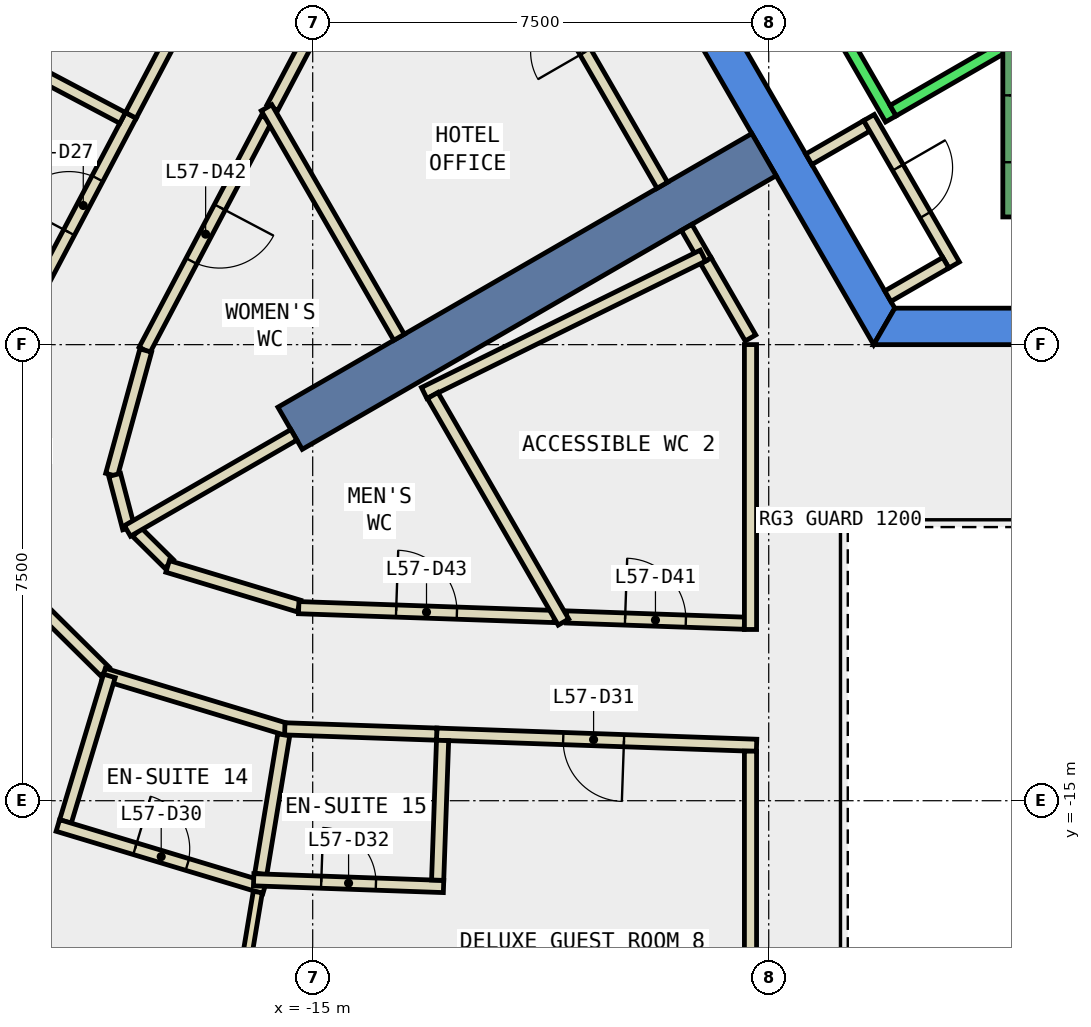
"""IFC4 building model, lengths in metres.
Left out: names, types, materials, properties, quantities, classifications, styles, units other than length and angle.
Written with IfcOpenShell. Run it as: python <this file> out.ifc"""

import sys

from ifc_helpers import new_model, si_unit, direction, frame, frame_2d, origin, place, context, subcontext, project, spatial, polyline, rectangle, outline, extrude, element, fill, save


model = new_model("IFC4")
c1 = context("Model", 3, precision=1e-05, world=origin(), true_north=direction((0.0, 1.0)))
c2 = subcontext(c1, "Body", "Model", "MODEL_VIEW")
j1 = project(units=[si_unit("LENGTHUNIT", "METRE"), si_unit("PLANEANGLEUNIT", "RADIAN")], contexts=[c1])
p1 = place(None, origin())
s1 = spatial("IfcSite", under=j1, at=p1, CompositionType="ELEMENT")
p2 = place(p1, origin())
s2 = spatial("IfcBuilding", under=s1, at=p2, CompositionType="ELEMENT")
p3 = place(p2, frame((0.0, 0.0, 252.2)))
s3 = spatial("IfcBuildingStorey", under=s2, at=p3, CompositionType="ELEMENT", Elevation=252.2)
p4 = place(p3, frame((0.0, 0.0, -0.34)))
e1 = element("IfcWall", 1, at=p4, inside=s3, PredefinedType="SHEAR", context=c2, shape_type="SweptSolid", body=[
    extrude(outline(polyline([(-11.547, 2.5), (-5.774, -7.5), (-5.427, -6.9), (-10.854, 2.5), (-11.547, 2.5)])), origin(), (0.0, 0.0, 1.0), 3.6),
])
p5 = place(p3, frame((0.0, 0.0, -0.34)))
e2 = element("IfcWall", 2, at=p5, inside=s3, PredefinedType="SHEAR", context=c2, shape_type="SweptSolid", body=[
    extrude(outline(polyline([(3.75, -7.5), (3.75, -6.9), (-5.427, -6.9), (-5.774, -7.5), (3.75, -7.5)])), origin(), (0.0, 0.0, 1.0), 3.6),
])
p6 = place(p3, frame((-7.578, -4.375, -0.34), z_axis=(0.0, 0.0, 1.0), x_axis=(-0.866024315419, -0.5000018851, 0.0)))
e3 = element("IfcWall", 3, at=p6, inside=s3, PredefinedType="SHEAR", context=c2, shape_type="SweptSolid", body=[
    extrude(rectangle(XDim=9.0, YDim=0.8, at=frame_2d((4.5, 0.0))), origin(), (0.0, 0.0, 1.0), 3.6),
])
p7 = place(p3, frame((-8.532, -6.123, 0.0), z_axis=(0.0, 0.0, 1.0), x_axis=(-0.499977104415, 0.866038622153, 0.0)))
e4 = element("IfcWall", 4, at=p7, inside=s3, PredefinedType="PARTITIONING", context=c2, shape_type="SweptSolid", body=[
    extrude(rectangle(XDim=0.636, YDim=0.2, at=frame_2d((0.318, 0.0))), origin(), (0.0, 0.0, 1.0), 3.26),
])
p8 = place(p3, frame((-15.064, -2.468, 0.0), z_axis=(0.0, 0.0, 1.0), x_axis=(-0.467126648849, -0.884190417238, 0.0)))
e5 = element("IfcWall", 5, at=p8, inside=s3, PredefinedType="PARTITIONING", context=c2, shape_type="SweptSolid", body=[
    extrude(rectangle(XDim=1.282, YDim=0.2, at=frame_2d((0.641, 0.0))), origin(), (0.0, 0.0, 1.0), 3.26),
])
p9 = place(p3, frame((-7.8, -7.39, 0.0), z_axis=(0.0, 0.0, 1.0), x_axis=(-0.500266477503, 0.865871498253, 0.0)))
e6 = element("IfcWall", 6, at=p9, inside=s3, PredefinedType="PARTITIONING", context=c2, shape_type="SweptSolid", body=[
    extrude(rectangle(XDim=1.463, YDim=0.2, at=frame_2d((0.731, 0.0))), origin(), (0.0, 0.0, 1.0), 3.26),
])
p10 = place(p3, frame((-10.826, -11.978, 0.0), z_axis=(0.0, 0.0, 1.0), x_axis=(0.999380679818, -0.035188873332, 0.0)))
e7 = element("IfcWall", 7, at=p10, inside=s3, PredefinedType="PARTITIONING", context=c2, shape_type="SweptSolid", body=[
    extrude(rectangle(XDim=2.928, YDim=0.2, at=frame_2d((1.464, 0.0))), origin(), (0.0, 0.0, 1.0), 3.26),
])
p11 = place(p10, frame((0.964, 0.0, 0.0)))
e8 = element("IfcOpeningElement", 8, at=p11, cuts=e7, PredefinedType="OPENING", context=c2, shape_type="SweptSolid", body=[
    extrude(rectangle(XDim=1.0, YDim=2.1, at=frame_2d((0.5, 1.05))), frame((0.0, 0.11, 0.0), z_axis=(0.0, -1.0, 0.0), x_axis=(1.0, 0.0, 0.0)), (0.0, 0.0, 1.0), 0.22),
])
p12 = place(p3, frame((-15.756, -3.779, 0.0), z_axis=(0.0, 0.0, 1.0), x_axis=(-0.46672043873, -0.884404902786, 0.0)))
e9 = element("IfcWall", 9, at=p12, inside=s3, PredefinedType="PARTITIONING", context=c2, shape_type="SweptSolid", body=[
    extrude(rectangle(XDim=4.307, YDim=0.2, at=frame_2d((2.153, 0.0))), origin(), (0.0, 0.0, 1.0), 3.26),
])
p13 = place(p12, frame((1.653, 0.0, 0.0)))
e10 = element("IfcOpeningElement", 10, at=p13, cuts=e9, PredefinedType="OPENING", context=c2, shape_type="SweptSolid", body=[
    extrude(rectangle(XDim=1.0, YDim=2.1, at=frame_2d((0.5, 1.05))), frame((0.0, 0.11, 0.0), z_axis=(0.0, -1.0, 0.0), x_axis=(1.0, 0.0, 0.0)), (0.0, 0.0, 1.0), 0.22),
])
p14 = place(p3, frame((-17.746, -7.596, 0.0), z_axis=(0.0, 0.0, 1.0), x_axis=(-0.264859637197, -0.96428697626, 0.0)))
e11 = element("IfcWall", 11, at=p14, inside=s3, PredefinedType="PARTITIONING", context=c2, shape_type="SweptSolid", body=[
    extrude(rectangle(XDim=2.122, YDim=0.2, at=frame_2d((1.061, 0.0))), origin(), (0.0, 0.0, 1.0), 3.26),
])
p15 = place(p3, frame((-18.257, -9.642, 0.0), z_axis=(0.0, 0.0, 1.0), x_axis=(0.253407342366, -0.967359663639, 0.0)))
e12 = element("IfcWall", 12, at=p15, inside=s3, PredefinedType="PARTITIONING", context=c2, shape_type="SweptSolid", body=[
    extrude(rectangle(XDim=0.907, YDim=0.2, at=frame_2d((0.454, 0.0))), origin(), (0.0, 0.0, 1.0), 3.26),
])
p16 = place(p3, frame((-17.89, -10.584, 0.0), z_axis=(0.0, 0.0, 1.0), x_axis=(0.711042348586, -0.70314918653, 0.0)))
e13 = element("IfcWall", 13, at=p16, inside=s3, PredefinedType="PARTITIONING", context=c2, shape_type="SweptSolid", body=[
    extrude(rectangle(XDim=0.742, YDim=0.2, at=frame_2d((0.371, 0.0))), origin(), (0.0, 0.0, 1.0), 3.26),
])
p17 = place(p3, frame((-17.386, -11.147, 0.0), z_axis=(0.0, 0.0, 1.0), x_axis=(0.957321496956, -0.289025174451, 0.0)))
e14 = element("IfcWall", 14, at=p17, inside=s3, PredefinedType="PARTITIONING", context=c2, shape_type="SweptSolid", body=[
    extrude(rectangle(XDim=2.256, YDim=0.2, at=frame_2d((1.128, 0.0))), origin(), (0.0, 0.0, 1.0), 3.26),
])
p18 = place(p3, frame((-15.23, -11.825, 0.0), z_axis=(0.0, 0.0, 1.0), x_axis=(0.999397560436, -0.0347061406, 0.0)))
e15 = element("IfcWall", 15, at=p18, inside=s3, PredefinedType="PARTITIONING", context=c2, shape_type="SweptSolid", body=[
    extrude(rectangle(XDim=4.207, YDim=0.2, at=frame_2d((2.103, 0.0))), origin(), (0.0, 0.0, 1.0), 3.26),
])
p19 = place(p18, frame((1.603, 0.0, 0.0)))
e16 = element("IfcOpeningElement", 16, at=p19, cuts=e15, PredefinedType="OPENING", context=c2, shape_type="SweptSolid", body=[
    extrude(rectangle(XDim=1.0, YDim=2.1, at=frame_2d((0.5, 1.05))), frame((0.0, 0.11, 0.0), z_axis=(0.0, -1.0, 0.0), x_axis=(1.0, 0.0, 0.0)), (0.0, 0.0, 1.0), 0.22),
])
p20 = place(p3, frame((-19.602, -6.781, 0.0), z_axis=(0.0, 0.0, 1.0), x_axis=(0.466827780692, 0.884348247679, 0.0)))
e17 = element("IfcWall", 17, at=p20, inside=s3, PredefinedType="PARTITIONING", context=c2, shape_type="SweptSolid", body=[
    extrude(rectangle(XDim=3.451, YDim=0.2, at=frame_2d((1.726, 0.0))), origin(), (0.0, 0.0, 1.0), 3.26),
])
p21 = place(p20, frame((1.275, 0.0, 0.0)))
e18 = element("IfcOpeningElement", 18, at=p21, cuts=e17, PredefinedType="OPENING", context=c2, shape_type="SweptSolid", body=[
    extrude(rectangle(XDim=1.0, YDim=2.1, at=frame_2d((0.5, 1.05))), frame((0.0, 0.11, 0.0), z_axis=(0.0, -1.0, 0.0), x_axis=(1.0, 0.0, 0.0)), (0.0, 0.0, 1.0), 0.22),
])
p22 = place(p3, frame((-17.991, -3.729, 0.0), z_axis=(0.0, 0.0, 1.0), x_axis=(0.466450569784, 0.88454726609, 0.0)))
e19 = element("IfcWall", 19, at=p22, inside=s3, PredefinedType="PARTITIONING", context=c2, shape_type="SweptSolid", body=[
    extrude(rectangle(XDim=2.6, YDim=0.2, at=frame_2d((1.3, 0.0))), origin(), (0.0, 0.0, 1.0), 3.26),
])
p23 = place(p3, frame((-18.415, -12.877, 0.0), z_axis=(0.0, 0.0, 1.0), x_axis=(-0.711078065077, 0.70311306727, 0.0)))
e20 = element("IfcWall", 20, at=p23, inside=s3, PredefinedType="PARTITIONING", context=c2, shape_type="SweptSolid", body=[
    extrude(rectangle(XDim=2.115, YDim=0.2, at=frame_2d((1.058, 0.0))), origin(), (0.0, 0.0, 1.0), 3.26),
])
p24 = place(p3, frame((-15.363, -13.847, 0.0), z_axis=(0.0, 0.0, 1.0), x_axis=(-0.957320969561, 0.289026921303, 0.0)))
e21 = element("IfcWall", 21, at=p24, inside=s3, PredefinedType="PARTITIONING", context=c2, shape_type="SweptSolid", body=[
    extrude(rectangle(XDim=3.214, YDim=0.2, at=frame_2d((1.607, 0.0))), origin(), (0.0, 0.0, 1.0), 3.26),
])
p25 = place(p3, frame((-7.7, -14.089, 0.0), z_axis=(0.0, 0.0, 1.0), x_axis=(-0.999388410674, 0.034968623214, 0.0)))
e22 = element("IfcWall", 22, at=p25, inside=s3, PredefinedType="PARTITIONING", context=c2, shape_type="SweptSolid", body=[
    extrude(rectangle(XDim=5.264, YDim=0.2, at=frame_2d((2.632, 0.0))), origin(), (0.0, 0.0, 1.0), 3.26),
])
p26 = place(p25, frame((2.182, 0.0, 0.0)))
e23 = element("IfcOpeningElement", 23, at=p26, cuts=e22, PredefinedType="OPENING", context=c2, shape_type="SweptSolid", body=[
    extrude(rectangle(XDim=1.0, YDim=2.1, at=frame_2d((0.5, 1.05))), frame((0.0, 0.11, 0.0), z_axis=(0.0, -1.0, 0.0), x_axis=(1.0, 0.0, 0.0)), (0.0, 0.0, 1.0), 0.22),
])
p27 = place(p3, frame((-12.961, -13.905, 0.0), z_axis=(0.0, 0.0, 1.0), x_axis=(-0.999395279268, 0.034771766949, 0.0)))
e24 = element("IfcWall", 24, at=p27, inside=s3, PredefinedType="PARTITIONING", context=c2, shape_type="SweptSolid", body=[
    extrude(rectangle(XDim=2.5, YDim=0.2, at=frame_2d((1.25, 0.0))), origin(), (0.0, 0.0, 1.0), 3.26),
])
p28 = place(p3, frame((-6.841, -4.452, 0.0), z_axis=(0.0, 0.0, 1.0), x_axis=(0.86621513555, 0.499671230855, 0.0)))
e25 = element("IfcWall", 25, at=p28, inside=s3, PredefinedType="PARTITIONING", context=c2, shape_type="SweptSolid", body=[
    extrude(rectangle(XDim=1.1, YDim=0.2, at=frame_2d((0.55, 0.0))), origin(), (0.0, 0.0, 1.0), 3.26),
])
p29 = place(p3, frame((-5.851, -3.765, 0.0), z_axis=(0.0, 0.0, 1.0), x_axis=(0.500011755427, -0.866018616679, 0.0)))
e26 = element("IfcWall", 26, at=p29, inside=s3, PredefinedType="PARTITIONING", context=c2, shape_type="SweptSolid", body=[
    extrude(rectangle(XDim=2.8, YDim=0.2, at=frame_2d((1.4, 0.0))), origin(), (0.0, 0.0, 1.0), 3.26),
])
p30 = place(p29, frame((0.95, 0.0, 0.0)))
e27 = element("IfcOpeningElement", 27, at=p30, cuts=e26, PredefinedType="OPENING", context=c2, shape_type="SweptSolid", body=[
    extrude(rectangle(XDim=0.9, YDim=2.1, at=frame_2d((0.45, 1.05))), frame((0.0, 0.11, 0.0), z_axis=(0.0, -1.0, 0.0), x_axis=(1.0, 0.0, 0.0)), (0.0, 0.0, 1.0), 0.22),
])
p31 = place(p3, frame((-4.588, -6.153, 0.0), z_axis=(0.0, 0.0, 1.0), x_axis=(-0.86621513555, -0.499671230855, 0.0)))
e28 = element("IfcWall", 28, at=p31, inside=s3, PredefinedType="PARTITIONING", context=c2, shape_type="SweptSolid", body=[
    extrude(rectangle(XDim=1.1, YDim=0.2, at=frame_2d((0.55, 0.0))), origin(), (0.0, 0.0, 1.0), 3.26),
])
p32 = place(p3, frame((-7.8, -12.184, 0.0), z_axis=(0.0, 0.0, 1.0), x_axis=(0.0, 1.0, 0.0)))
e29 = element("IfcWall", 29, at=p32, inside=s3, PredefinedType="PARTITIONING", context=c2, shape_type="SweptSolid", body=[
    extrude(rectangle(XDim=4.685, YDim=0.2, at=frame_2d((2.343, 0.0))), origin(), (0.0, 0.0, 1.0), 3.26),
])
p33 = place(p3, frame((-7.8, -18.669, 0.0), z_axis=(0.0, 0.0, 1.0), x_axis=(0.0, 1.0, 0.0)))
e30 = element("IfcWall", 30, at=p33, inside=s3, PredefinedType="PARTITIONING", context=c2, shape_type="SweptSolid", body=[
    extrude(rectangle(XDim=4.484, YDim=0.2, at=frame_2d((2.242, 0.0))), origin(), (0.0, 0.0, 1.0), 3.26),
])
p34 = place(p3, frame((-8.582, -6.036, 0.0), z_axis=(0.0, 0.0, 1.0), x_axis=(-0.897105141673, -0.441817116897, 0.0)))
e31 = element("IfcWall", 31, at=p34, inside=s3, PredefinedType="PARTITIONING", context=c2, shape_type="SweptSolid", body=[
    extrude(rectangle(XDim=5.111, YDim=0.2, at=frame_2d((2.555, 0.0))), origin(), (0.0, 0.0, 1.0), 3.26),
])
p35 = place(p3, frame((-13.58, -7.379, 0.0), z_axis=(0.0, 0.0, 1.0), x_axis=(-0.499916403993, 0.866073662582, 0.0)))
e32 = element("IfcWall", 32, at=p35, inside=s3, PredefinedType="PARTITIONING", context=c2, shape_type="SweptSolid", body=[
    extrude(rectangle(XDim=4.359, YDim=0.2, at=frame_2d((2.179, 0.0))), origin(), (0.0, 0.0, 1.0), 3.26),
])
p36 = place(p3, frame((-10.876, -12.062, 0.0), z_axis=(0.0, 0.0, 1.0), x_axis=(-0.499977877545, 0.866038175813, 0.0)))
e33 = element("IfcWall", 33, at=p36, inside=s3, PredefinedType="PARTITIONING", context=c2, shape_type="SweptSolid", body=[
    extrude(rectangle(XDim=4.302, YDim=0.2, at=frame_2d((2.151, 0.0))), origin(), (0.0, 0.0, 1.0), 3.26),
])
p37 = place(p3, frame((-15.31, -8.983, 0.0), z_axis=(0.0, 0.0, 1.0), x_axis=(-0.866047943894, -0.499960957353, 0.0)))
e34 = element("IfcWall", 34, at=p37, inside=s3, PredefinedType="PARTITIONING", context=c2, shape_type="SweptSolid", body=[
    extrude(rectangle(XDim=3.16, YDim=0.2, at=frame_2d((1.58, 0.0))), origin(), (0.0, 0.0, 1.0), 3.26),
])
p38 = place(p3, frame((-19.069, -0.418, 0.0), z_axis=(0.0, 0.0, 1.0), x_axis=(-0.467007153784, -0.884253537349, 0.0)))
e35 = element("IfcWall", 35, at=p38, inside=s3, PredefinedType="PARTITIONING", context=c2, shape_type="SweptSolid", body=[
    extrude(rectangle(XDim=2.625, YDim=0.2, at=frame_2d((1.312, 0.0))), origin(), (0.0, 0.0, 1.0), 3.26),
])
p39 = place(p38, frame((0.763, 0.0, 0.0)))
e36 = element("IfcOpeningElement", 36, at=p39, cuts=e35, PredefinedType="OPENING", context=c2, shape_type="SweptSolid", body=[
    extrude(rectangle(XDim=0.9, YDim=2.1, at=frame_2d((0.45, 1.05))), frame((0.0, 0.11, 0.0), z_axis=(0.0, -1.0, 0.0), x_axis=(1.0, 0.0, 0.0)), (0.0, 0.0, 1.0), 0.22),
])
p40 = place(p3, frame((-20.16, -2.697, 0.0), z_axis=(0.0, 0.0, 1.0), x_axis=(0.884293452572, -0.466931568583, 0.0)))
e37 = element("IfcWall", 37, at=p40, inside=s3, PredefinedType="PARTITIONING", context=c2, shape_type="SweptSolid", body=[
    extrude(rectangle(XDim=2.3, YDim=0.2, at=frame_2d((1.15, 0.0))), origin(), (0.0, 0.0, 1.0), 3.26),
])
p41 = place(p3, frame((-18.344, -12.947, 0.0), z_axis=(0.0, 0.0, 1.0), x_axis=(-0.288709122303, -0.957416859419, 0.0)))
e38 = element("IfcWall", 38, at=p41, inside=s3, PredefinedType="PARTITIONING", context=c2, shape_type="SweptSolid", body=[
    extrude(rectangle(XDim=2.5, YDim=0.2, at=frame_2d((1.25, 0.0))), origin(), (0.0, 0.0, 1.0), 3.26),
])
p42 = place(p3, frame((-19.191, -15.407, 0.0), z_axis=(0.0, 0.0, 1.0), x_axis=(0.957443200759, -0.28862175476, 0.0)))
e39 = element("IfcWall", 39, at=p42, inside=s3, PredefinedType="PARTITIONING", context=c2, shape_type="SweptSolid", body=[
    extrude(rectangle(XDim=3.551, YDim=0.2, at=frame_2d((1.775, 0.0))), origin(), (0.0, 0.0, 1.0), 3.26),
])
p43 = place(p42, frame((1.325, 0.0, 0.0)))
e40 = element("IfcOpeningElement", 40, at=p43, cuts=e39, PredefinedType="OPENING", context=c2, shape_type="SweptSolid", body=[
    extrude(rectangle(XDim=0.9, YDim=2.1, at=frame_2d((0.45, 1.05))), frame((0.0, 0.11, 0.0), z_axis=(0.0, -1.0, 0.0), x_axis=(1.0, 0.0, 0.0)), (0.0, 0.0, 1.0), 0.22),
])
p44 = place(p3, frame((-15.903, -16.502, 0.0), z_axis=(0.0, 0.0, 1.0), x_axis=(-0.163715562906, -0.986507584594, 0.0)))
e41 = element("IfcWall", 41, at=p44, inside=s3, PredefinedType="PARTITIONING", context=c2, shape_type="SweptSolid", body=[
    extrude(rectangle(XDim=1.912, YDim=0.15, at=frame_2d((0.956, 0.0))), origin(), (0.0, 0.0, 1.0), 3.26),
])
p45 = place(p3, frame((-15.476, -13.917, 0.0), z_axis=(0.0, 0.0, 1.0), x_axis=(-0.162964805234, -0.986631882849, 0.0)))
e42 = element("IfcWall", 42, at=p45, inside=s3, PredefinedType="PARTITIONING", context=c2, shape_type="SweptSolid", body=[
    extrude(rectangle(XDim=2.319, YDim=0.2, at=frame_2d((1.16, 0.0))), origin(), (0.0, 0.0, 1.0), 3.26),
])
p46 = place(p3, frame((-15.971, -16.3, 0.0), z_axis=(0.0, 0.0, 1.0), x_axis=(0.999370791233, -0.035468600627, 0.0)))
e43 = element("IfcWall", 43, at=p46, inside=s3, PredefinedType="PARTITIONING", context=c2, shape_type="SweptSolid", body=[
    extrude(rectangle(XDim=3.125, YDim=0.2, at=frame_2d((1.562, 0.0))), origin(), (0.0, 0.0, 1.0), 3.26),
])
p47 = place(p46, frame((1.112, 0.0, 0.0)))
e44 = element("IfcOpeningElement", 44, at=p47, cuts=e43, PredefinedType="OPENING", context=c2, shape_type="SweptSolid", body=[
    extrude(rectangle(XDim=0.9, YDim=2.1, at=frame_2d((0.45, 1.05))), frame((0.0, 0.11, 0.0), z_axis=(0.0, -1.0, 0.0), x_axis=(1.0, 0.0, 0.0)), (0.0, 0.0, 1.0), 0.22),
])
p48 = place(p3, frame((-12.945, -16.307, 0.0), z_axis=(0.0, 0.0, 1.0), x_axis=(0.035252193458, 0.999378448265, 0.0)))
e45 = element("IfcWall", 45, at=p48, inside=s3, PredefinedType="PARTITIONING", context=c2, shape_type="SweptSolid", body=[
    extrude(rectangle(XDim=2.299, YDim=0.2, at=frame_2d((1.15, 0.0))), origin(), (0.0, 0.0, 1.0), 3.26),
])
p49 = place(p3, frame((-9.25, -4.879, 0.0), z_axis=(0.0, 0.0, 1.0), x_axis=(-0.499944124422, 0.866057661161, 0.0)))
e46 = element("IfcWall", 46, at=p49, inside=s3, PredefinedType="PARTITIONING", context=c2, shape_type="SweptSolid", body=[
    extrude(rectangle(XDim=7.405, YDim=0.2, at=frame_2d((3.702, 0.0))), origin(), (0.0, 0.0, 1.0), 3.26),
])
p50 = place(p49, frame((2.533, 0.0, 0.0)))
e47 = element("IfcOpeningElement", 47, at=p50, cuts=e46, PredefinedType="OPENING", context=c2, shape_type="SweptSolid", body=[
    extrude(rectangle(XDim=0.9, YDim=2.1, at=frame_2d((0.45, 1.05))), frame((0.0, 0.11, 0.0), z_axis=(0.0, -1.0, 0.0), x_axis=(1.0, 0.0, 0.0)), (0.0, 0.0, 1.0), 0.22),
])
p51 = place(p3, frame((-8.192, 0.888, 0.0), z_axis=(0.0, 0.0, 1.0), x_axis=(0.500034260056, -0.866005622828, 0.0)))
e48 = element("IfcWall", 48, at=p51, inside=s3, PredefinedType="STANDARD", context=c2, shape_type="SweptSolid", body=[
    extrude(rectangle(XDim=5.399, YDim=0.2, at=frame_2d((2.7, 0.0))), origin(), (0.0, 0.0, 1.0), 3.26),
])
p52 = place(p3, frame((-3.377, -2.452, 0.0), z_axis=(0.0, 0.0, 1.0), x_axis=(-0.865955154139, -0.50012165622, 0.0)))
e49 = element("IfcWall", 49, at=p52, inside=s3, PredefinedType="STANDARD", context=c2, shape_type="SweptSolid", body=[
    extrude(rectangle(XDim=2.4, YDim=0.2, at=frame_2d((1.2, 0.0))), origin(), (0.0, 0.0, 1.0), 3.26),
])
p53 = place(p3, frame((-3.55, -1.0, 0.0), z_axis=(0.0, 0.0, 1.0), x_axis=(0.0, -1.0, 0.0)))
e50 = element("IfcWall", 50, at=p53, inside=s3, PredefinedType="STANDARD", context=c2, shape_type="SweptSolid", body=[
    extrude(rectangle(XDim=4.4, YDim=0.2, at=frame_2d((2.2, 0.0))), origin(), (0.0, 0.0, 1.0), 3.26),
])
p54 = place(p53, frame((2.4, 0.0, 0.0)))
e51 = element("IfcOpeningElement", 51, at=p54, cuts=e50, PredefinedType="OPENING", context=c2, shape_type="SweptSolid", body=[
    extrude(rectangle(XDim=1.1, YDim=2.2, at=frame_2d((0.55, 1.1))), frame((0.0, 0.11, 0.0), z_axis=(0.0, -1.0, 0.0), x_axis=(1.0, 0.0, 0.0)), (0.0, 0.0, 1.0), 0.22),
])
p55 = place(p21, origin())
e52 = element("IfcDoor", 52, at=p55, inside=s3, OperationType="SINGLE_SWING_LEFT", PredefinedType="DOOR", context=c2, shape_type="SweptSolid", body=[
    extrude(rectangle(XDim=1.0, YDim=2.1, at=frame_2d((0.5, 1.05))), frame((0.0, 0.025, 0.0), z_axis=(0.0, -1.0, 0.0), x_axis=(1.0, 0.0, 0.0)), (0.0, 0.0, 1.0), 0.05),
])
fill(e18, e52)
p56 = place(p43, origin())
e53 = element("IfcDoor", 53, at=p56, inside=s3, OperationType="SINGLE_SWING_LEFT", PredefinedType="DOOR", context=c2, shape_type="SweptSolid", body=[
    extrude(rectangle(XDim=0.9, YDim=2.1, at=frame_2d((0.45, 1.05))), frame((0.0, 0.025, 0.0), z_axis=(0.0, -1.0, 0.0), x_axis=(1.0, 0.0, 0.0)), (0.0, 0.0, 1.0), 0.05),
])
fill(e40, e53)
p57 = place(p26, origin())
e54 = element("IfcDoor", 54, at=p57, inside=s3, OperationType="SINGLE_SWING_LEFT", PredefinedType="DOOR", context=c2, shape_type="SweptSolid", body=[
    extrude(rectangle(XDim=1.0, YDim=2.1, at=frame_2d((0.5, 1.05))), frame((0.0, 0.025, 0.0), z_axis=(0.0, -1.0, 0.0), x_axis=(1.0, 0.0, 0.0)), (0.0, 0.0, 1.0), 0.05),
])
fill(e23, e54)
p58 = place(p47, origin())
e55 = element("IfcDoor", 55, at=p58, inside=s3, OperationType="SINGLE_SWING_LEFT", PredefinedType="DOOR", context=c2, shape_type="SweptSolid", body=[
    extrude(rectangle(XDim=0.9, YDim=2.1, at=frame_2d((0.45, 1.05))), frame((0.0, 0.025, 0.0), z_axis=(0.0, -1.0, 0.0), x_axis=(1.0, 0.0, 0.0)), (0.0, 0.0, 1.0), 0.05),
])
fill(e44, e55)
p59 = place(p50, origin())
e56 = element("IfcDoor", 56, at=p59, inside=s3, OperationType="SINGLE_SWING_RIGHT", PredefinedType="DOOR", context=c2, shape_type="SweptSolid", body=[
    extrude(rectangle(XDim=0.9, YDim=2.1, at=frame_2d((0.45, 1.05))), frame((0.0, 0.025, 0.0), z_axis=(0.0, -1.0, 0.0), x_axis=(1.0, 0.0, 0.0)), (0.0, 0.0, 1.0), 0.05),
])
fill(e47, e56)
p60 = place(p11, origin())
e57 = element("IfcDoor", 57, at=p60, inside=s3, OperationType="SINGLE_SWING_LEFT", PredefinedType="DOOR", context=c2, shape_type="SweptSolid", body=[
    extrude(rectangle(XDim=1.0, YDim=2.1, at=frame_2d((0.5, 1.05))), frame((0.0, 0.025, 0.0), z_axis=(0.0, -1.0, 0.0), x_axis=(1.0, 0.0, 0.0)), (0.0, 0.0, 1.0), 0.05),
])
fill(e8, e57)
p61 = place(p13, origin())
e58 = element("IfcDoor", 58, at=p61, inside=s3, OperationType="SINGLE_SWING_LEFT", PredefinedType="DOOR", context=c2, shape_type="SweptSolid", body=[
    extrude(rectangle(XDim=1.0, YDim=2.1, at=frame_2d((0.5, 1.05))), frame((0.0, 0.025, 0.0), z_axis=(0.0, -1.0, 0.0), x_axis=(1.0, 0.0, 0.0)), (0.0, 0.0, 1.0), 0.05),
])
fill(e10, e58)
p62 = place(p19, origin())
e59 = element("IfcDoor", 59, at=p62, inside=s3, OperationType="SINGLE_SWING_LEFT", PredefinedType="DOOR", context=c2, shape_type="SweptSolid", body=[
    extrude(rectangle(XDim=1.0, YDim=2.1, at=frame_2d((0.5, 1.05))), frame((0.0, 0.025, 0.0), z_axis=(0.0, -1.0, 0.0), x_axis=(1.0, 0.0, 0.0)), (0.0, 0.0, 1.0), 0.05),
])
fill(e16, e59)
p63 = place(p30, origin())
e60 = element("IfcDoor", 60, at=p63, inside=s3, OperationType="SINGLE_SWING_RIGHT", PredefinedType="DOOR", context=c2, shape_type="SweptSolid", body=[
    extrude(rectangle(XDim=0.9, YDim=2.1, at=frame_2d((0.45, 1.05))), frame((0.0, 0.025, 0.0), z_axis=(0.0, -1.0, 0.0), x_axis=(1.0, 0.0, 0.0)), (0.0, 0.0, 1.0), 0.05),
])
fill(e27, e60)
p64 = place(p54, origin())
e61 = element("IfcDoor", 61, at=p64, inside=s3, OperationType="SINGLE_SWING_LEFT", PredefinedType="DOOR", context=c2, shape_type="SweptSolid", body=[
    extrude(rectangle(XDim=1.1, YDim=2.2, at=frame_2d((0.55, 1.1))), frame((0.0, 0.025, 0.0), z_axis=(0.0, -1.0, 0.0), x_axis=(1.0, 0.0, 0.0)), (0.0, 0.0, 1.0), 0.05),
])
fill(e51, e61)
save(model, sys.argv[1])
